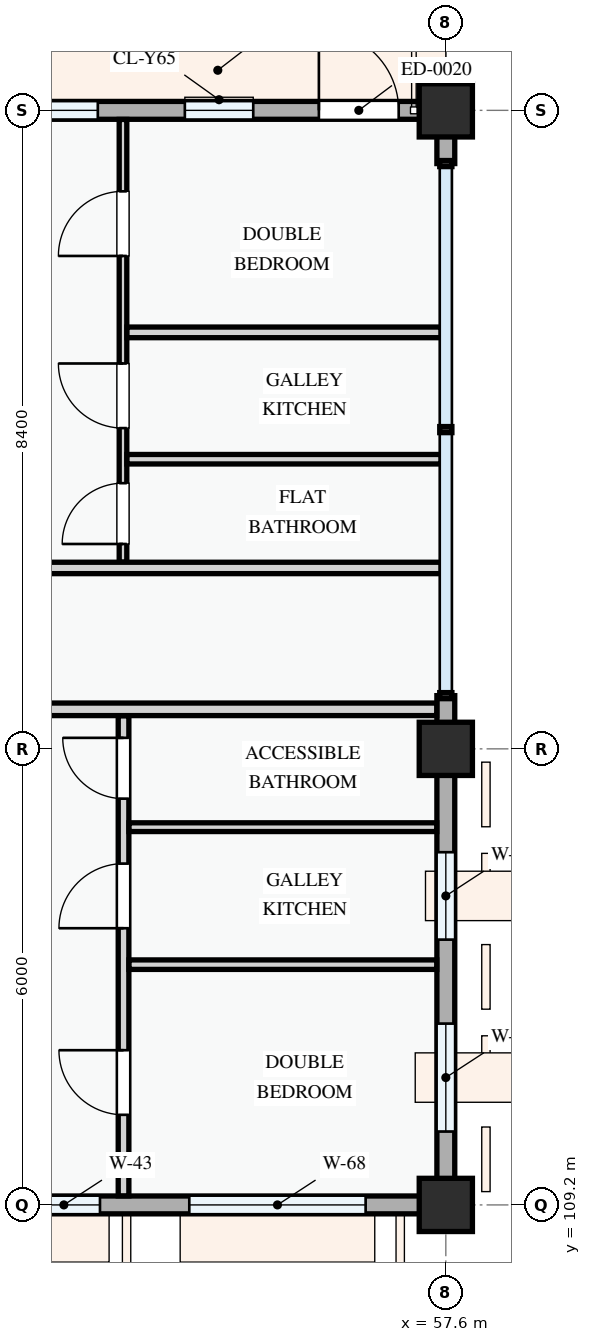
"""IFC4 building model, lengths in metres.
Left out: names, types, materials, properties, quantities, classifications, styles, units other than length and angle.
Written with IfcOpenShell. Run it as: python <this file> out.ifc"""

import sys

from ifc_helpers import new_model, si_unit, direction, frame, frame_2d, origin, origin_2d, place, context, subcontext, project, spatial, rectangle, extrude, element, fill, save


model = new_model("IFC4")
c1 = context("Model", 3, precision=1e-05, world=origin(), true_north=direction((0.0, 1.0)))
c2 = subcontext(c1, "Body", "Model", "MODEL_VIEW")
j1 = project(units=[si_unit("LENGTHUNIT", "METRE"), si_unit("PLANEANGLEUNIT", "RADIAN")], contexts=[c1])
p1 = place(None, origin())
s1 = spatial("IfcSite", under=j1, at=p1, CompositionType="ELEMENT")
p2 = place(p1, origin())
s2 = spatial("IfcBuilding", under=s1, at=p2, CompositionType="ELEMENT")
p3 = place(p2, frame((0.0, 0.0, 11.4)))
s3 = spatial("IfcBuildingStorey", under=s2, at=p3, CompositionType="ELEMENT", Elevation=11.4)
for number, where, z_axis, x_axis in (
    (1, (57.6, 109.2, 0.0), (0.0, 0.0, 1.0), (1.0, 0.0, 0.0)),
    (2, (57.6, 115.2, 0.0), (0.0, 0.0, 1.0), (1.0, 0.0, 0.0)),
    (3, (57.6, 123.6, 0.0), (0.0, 0.0, 1.0), (1.0, 0.0, 0.0)),
):
    element("IfcColumn", number, at=place(p3, frame(where, z_axis=z_axis, x_axis=x_axis)), inside=s3, PredefinedType="COLUMN", context=c2, shape_type="SweptSolid", body=[
        extrude(rectangle(XDim=0.7, YDim=0.7, at=origin_2d()), origin(), (0.0, 0.0, 1.0), 3.3),
    ])
p4 = place(p3, frame((51.6, 109.2, 0.0), z_axis=(0.0, 0.0, 1.0), x_axis=(1.0, 0.0, 0.0)))
e4 = element("IfcWall", 4, at=p4, inside=s3, PredefinedType="STANDARD", context=c2, shape_type="SweptSolid", body=[
    extrude(rectangle(XDim=6.0, YDim=0.235, at=frame_2d((3.0, 0.0))), origin(), (0.0, 0.0, 1.0), 2.475),
])
p5 = place(p4, frame((0.5, 0.0, 0.78)))
e5 = element("IfcOpeningElement", 5, at=p5, cuts=e4, PredefinedType="OPENING", context=c2, shape_type="SweptSolid", body=[
    extrude(rectangle(XDim=0.95, YDim=1.15, at=frame_2d((0.475, 0.575))), frame((0.0, 0.127, 0.0), z_axis=(0.0, -1.0, 0.0), x_axis=(1.0, 0.0, 0.0)), (0.0, 0.0, 1.0), 0.255),
])
p6 = place(p4, frame((2.625, 0.0, 0.78)))
e6 = element("IfcOpeningElement", 6, at=p6, cuts=e4, PredefinedType="OPENING", context=c2, shape_type="SweptSolid", body=[
    extrude(rectangle(XDim=2.32, YDim=1.5, at=frame_2d((1.16, 0.75))), frame((0.0, 0.127, 0.0), z_axis=(0.0, -1.0, 0.0), x_axis=(1.0, 0.0, 0.0)), (0.0, 0.0, 1.0), 0.255),
])
p7 = place(p3, frame((57.6, 109.2, 0.0), z_axis=(0.0, 0.0, 1.0), x_axis=(0.0, 1.0, 0.0)))
e7 = element("IfcWall", 7, at=p7, inside=s3, PredefinedType="STANDARD", context=c2, shape_type="SweptSolid", body=[
    extrude(rectangle(XDim=6.0, YDim=0.235, at=frame_2d((3.0, 0.0))), origin(), (0.0, 0.0, 1.0), 2.575),
])
p8 = place(p7, frame((0.965, 0.0, 0.78)))
e8 = element("IfcOpeningElement", 8, at=p8, cuts=e7, PredefinedType="OPENING", context=c2, shape_type="SweptSolid", body=[
    extrude(rectangle(XDim=1.42, YDim=1.38, at=frame_2d((0.71, 0.69))), frame((0.0, 0.127, 0.0), z_axis=(0.0, -1.0, 0.0), x_axis=(1.0, 0.0, 0.0)), (0.0, 0.0, 1.0), 0.255),
])
p9 = place(p7, frame((3.49, 0.0, 0.78)))
e9 = element("IfcOpeningElement", 9, at=p9, cuts=e7, PredefinedType="OPENING", context=c2, shape_type="SweptSolid", body=[
    extrude(rectangle(XDim=1.15, YDim=1.25, at=frame_2d((0.575, 0.625))), frame((0.0, 0.127, 0.0), z_axis=(0.0, -1.0, 0.0), x_axis=(1.0, 0.0, 0.0)), (0.0, 0.0, 1.0), 0.255),
])
p10 = place(p3, frame((57.6, 115.2, 0.0), z_axis=(0.0, 0.0, 1.0), x_axis=(0.0, 1.0, 0.0)))
e10 = element("IfcWall", 10, at=p10, inside=s3, PredefinedType="STANDARD", context=c2, shape_type="SweptSolid", body=[
    extrude(rectangle(XDim=0.7, YDim=0.235, at=frame_2d((0.35, 0.0))), origin(), (0.0, 0.0, 1.0), 2.425),
])
p11 = place(p3, frame((57.6, 122.9, 0.0), z_axis=(0.0, 0.0, 1.0), x_axis=(0.0, 1.0, 0.0)))
e11 = element("IfcWall", 11, at=p11, inside=s3, PredefinedType="STANDARD", context=c2, shape_type="SweptSolid", body=[
    extrude(rectangle(XDim=0.581, YDim=0.235, at=frame_2d((0.29, 0.0))), origin(), (0.0, 0.0, 1.0), 2.425),
])
p12 = place(p3, frame((57.6, 123.6, 0.0), z_axis=(0.0, 0.0, 1.0), x_axis=(-1.0, 0.0, 0.0)))
e12 = element("IfcWall", 12, at=p12, inside=s3, PredefinedType="STANDARD", context=c2, shape_type="SweptSolid", body=[
    extrude(rectangle(XDim=6.0, YDim=0.235, at=frame_2d((3.0, 0.0))), origin(), (0.0, 0.0, 1.0), 2.475),
])
p13 = place(p12, frame((0.62, 0.0, 0.0)))
e13 = element("IfcOpeningElement", 13, at=p13, cuts=e12, PredefinedType="OPENING", context=c2, shape_type="SweptSolid", body=[
    extrude(rectangle(XDim=1.05, YDim=2.15, at=frame_2d((0.525, 1.075))), frame((0.0, 0.127, 0.0), z_axis=(0.0, -1.0, 0.0), x_axis=(1.0, 0.0, 0.0)), (0.0, 0.0, 1.0), 0.255),
])
p14 = place(p12, frame((2.534, 0.0, 0.78)))
e14 = element("IfcOpeningElement", 14, at=p14, cuts=e12, PredefinedType="OPENING", context=c2, shape_type="SweptSolid", body=[
    extrude(rectangle(XDim=0.9, YDim=1.2, at=frame_2d((0.45, 0.6))), frame((0.0, 0.127, 0.0), z_axis=(0.0, -1.0, 0.0), x_axis=(1.0, 0.0, 0.0)), (0.0, 0.0, 1.0), 0.255),
])
p15 = place(p12, frame((4.579, 0.0, 0.78)))
e15 = element("IfcOpeningElement", 15, at=p15, cuts=e12, PredefinedType="OPENING", context=c2, shape_type="SweptSolid", body=[
    extrude(rectangle(XDim=0.9, YDim=1.2, at=frame_2d((0.45, 0.6))), frame((0.0, 0.127, 0.0), z_axis=(0.0, -1.0, 0.0), x_axis=(1.0, 0.0, 0.0)), (0.0, 0.0, 1.0), 0.255),
])
p16 = place(p3, frame((53.36, 109.32, 0.0), z_axis=(0.0, 0.0, 1.0), x_axis=(0.0, 1.0, 0.0)))
e16 = element("IfcWall", 16, at=p16, inside=s3, PredefinedType="PARTITIONING", context=c2, shape_type="SweptSolid", body=[
    extrude(rectangle(XDim=6.316, YDim=0.14, at=frame_2d((3.158, 0.0))), origin(), (0.0, 0.0, 1.0), 3.0),
])
p17 = place(p16, frame((1.066, 0.0, 0.0)))
e17 = element("IfcOpeningElement", 17, at=p17, cuts=e16, PredefinedType="OPENING", context=c2, shape_type="SweptSolid", body=[
    extrude(rectangle(XDim=0.85, YDim=2.1, at=frame_2d((0.425, 1.05))), frame((0.0, 0.08, 0.0), z_axis=(0.0, -1.0, 0.0), x_axis=(1.0, 0.0, 0.0)), (0.0, 0.0, 1.0), 0.16),
])
p18 = place(p16, frame((3.521, 0.0, 0.0)))
e18 = element("IfcOpeningElement", 18, at=p18, cuts=e16, PredefinedType="OPENING", context=c2, shape_type="SweptSolid", body=[
    extrude(rectangle(XDim=0.85, YDim=2.1, at=frame_2d((0.425, 1.05))), frame((0.0, 0.08, 0.0), z_axis=(0.0, -1.0, 0.0), x_axis=(1.0, 0.0, 0.0)), (0.0, 0.0, 1.0), 0.16),
])
p19 = place(p16, frame((5.225, 0.0, 0.0)))
e19 = element("IfcOpeningElement", 19, at=p19, cuts=e16, PredefinedType="OPENING", context=c2, shape_type="SweptSolid", body=[
    extrude(rectangle(XDim=0.8, YDim=2.1, at=frame_2d((0.4, 1.05))), frame((0.0, 0.08, 0.0), z_axis=(0.0, -1.0, 0.0), x_axis=(1.0, 0.0, 0.0)), (0.0, 0.0, 1.0), 0.16),
])
p20 = place(p3, frame((53.432, 112.361, 0.0), z_axis=(0.0, 0.0, 1.0), x_axis=(1.0, 0.0, 0.0)))
e20 = element("IfcWall", 20, at=p20, inside=s3, PredefinedType="PARTITIONING", context=c2, shape_type="SweptSolid", body=[
    extrude(rectangle(XDim=4.049, YDim=0.125, at=frame_2d((2.024, 0.0))), origin(), (0.0, 0.0, 1.0), 3.0),
])
p21 = place(p3, frame((53.432, 114.17, 0.0), z_axis=(0.0, 0.0, 1.0), x_axis=(1.0, 0.0, 0.0)))
e21 = element("IfcWall", 21, at=p21, inside=s3, PredefinedType="PARTITIONING", context=c2, shape_type="SweptSolid", body=[
    extrude(rectangle(XDim=4.049, YDim=0.115, at=frame_2d((2.024, 0.0))), origin(), (0.0, 0.0, 1.0), 3.0),
])
p22 = place(p3, frame((53.353, 117.657, 0.0), z_axis=(0.0, 0.0, 1.0), x_axis=(0.0, 1.0, 0.0)))
e22 = element("IfcWall", 22, at=p22, inside=s3, PredefinedType="PARTITIONING", context=c2, shape_type="SweptSolid", body=[
    extrude(rectangle(XDim=5.823, YDim=0.1, at=frame_2d((2.912, 0.0))), origin(), (0.0, 0.0, 1.0), 3.0),
])
p23 = place(p22, frame((0.238, 0.0, 0.0)))
e23 = element("IfcOpeningElement", 23, at=p23, cuts=e22, PredefinedType="OPENING", context=c2, shape_type="SweptSolid", body=[
    extrude(rectangle(XDim=0.8, YDim=2.1, at=frame_2d((0.4, 1.05))), frame((0.0, 0.06, 0.0), z_axis=(0.0, -1.0, 0.0), x_axis=(1.0, 0.0, 0.0)), (0.0, 0.0, 1.0), 0.12),
])
p24 = place(p22, frame((1.763, 0.0, 0.0)))
e24 = element("IfcOpeningElement", 24, at=p24, cuts=e22, PredefinedType="OPENING", context=c2, shape_type="SweptSolid", body=[
    extrude(rectangle(XDim=0.85, YDim=2.1, at=frame_2d((0.425, 1.05))), frame((0.0, 0.06, 0.0), z_axis=(0.0, -1.0, 0.0), x_axis=(1.0, 0.0, 0.0)), (0.0, 0.0, 1.0), 0.12),
])
p25 = place(p22, frame((4.028, 0.0, 0.0)))
e25 = element("IfcOpeningElement", 25, at=p25, cuts=e22, PredefinedType="OPENING", context=c2, shape_type="SweptSolid", body=[
    extrude(rectangle(XDim=0.85, YDim=2.1, at=frame_2d((0.425, 1.05))), frame((0.0, 0.06, 0.0), z_axis=(0.0, -1.0, 0.0), x_axis=(1.0, 0.0, 0.0)), (0.0, 0.0, 1.0), 0.12),
])
p26 = place(p3, frame((53.405, 120.679, 0.0), z_axis=(0.0, 0.0, 1.0), x_axis=(1.0, 0.0, 0.0)))
e26 = element("IfcWall", 26, at=p26, inside=s3, PredefinedType="PARTITIONING", context=c2, shape_type="SweptSolid", body=[
    extrude(rectangle(XDim=4.135, YDim=0.14, at=frame_2d((2.068, 0.0))), origin(), (0.0, 0.0, 1.0), 3.0),
])
p27 = place(p3, frame((53.405, 119.01, 0.0), z_axis=(0.0, 0.0, 1.0), x_axis=(1.0, 0.0, 0.0)))
e27 = element("IfcWall", 27, at=p27, inside=s3, PredefinedType="PARTITIONING", context=c2, shape_type="SweptSolid", body=[
    extrude(rectangle(XDim=4.135, YDim=0.125, at=frame_2d((2.068, 0.0))), origin(), (0.0, 0.0, 1.0), 3.0),
])
p28 = place(p3, frame((25.15, 115.72, 0.0), z_axis=(0.0, 0.0, 1.0), x_axis=(1.0, 0.0, 0.0)))
e28 = element("IfcWall", 28, at=p28, inside=s3, PredefinedType="PARTITIONING", context=c2, shape_type="SweptSolid", body=[
    extrude(rectangle(XDim=32.331, YDim=0.165, at=frame_2d((16.165, 0.0))), origin(), (0.0, 0.0, 1.0), 3.0),
])
p29 = place(p28, frame((0.25, 0.0, 0.0)))
e29 = element("IfcOpeningElement", 29, at=p29, cuts=e28, PredefinedType="OPENING", context=c2, shape_type="SweptSolid", body=[
    extrude(rectangle(XDim=0.92, YDim=2.1, at=frame_2d((0.46, 1.05))), frame((0.0, 0.093, 0.0), z_axis=(0.0, -1.0, 0.0), x_axis=(1.0, 0.0, 0.0)), (0.0, 0.0, 1.0), 0.185),
])
p30 = place(p28, frame((14.548, 0.0, 0.0)))
e30 = element("IfcOpeningElement", 30, at=p30, cuts=e28, PredefinedType="OPENING", context=c2, shape_type="SweptSolid", body=[
    extrude(rectangle(XDim=0.96, YDim=2.12, at=frame_2d((0.48, 1.06))), frame((0.0, 0.093, 0.0), z_axis=(0.0, -1.0, 0.0), x_axis=(1.0, 0.0, 0.0)), (0.0, 0.0, 1.0), 0.185),
])
p31 = place(p28, frame((22.28, 0.0, 0.0)))
e31 = element("IfcOpeningElement", 31, at=p31, cuts=e28, PredefinedType="OPENING", context=c2, shape_type="SweptSolid", body=[
    extrude(rectangle(XDim=0.92, YDim=2.1, at=frame_2d((0.46, 1.05))), frame((0.0, 0.093, 0.0), z_axis=(0.0, -1.0, 0.0), x_axis=(1.0, 0.0, 0.0)), (0.0, 0.0, 1.0), 0.185),
])
p32 = place(p3, frame((22.66, 117.58, 0.0), z_axis=(0.0, 0.0, 1.0), x_axis=(1.0, 0.0, 0.0)))
e32 = element("IfcWall", 32, at=p32, inside=s3, PredefinedType="PARTITIONING", context=c2, shape_type="SweptSolid", body=[
    extrude(rectangle(XDim=34.88, YDim=0.15, at=frame_2d((17.44, 0.0))), origin(), (0.0, 0.0, 1.0), 3.0),
])
p33 = place(p32, frame((2.74, 0.0, 0.0)))
e33 = element("IfcOpeningElement", 33, at=p33, cuts=e32, PredefinedType="OPENING", context=c2, shape_type="SweptSolid", body=[
    extrude(rectangle(XDim=0.92, YDim=2.1, at=frame_2d((0.46, 1.05))), frame((0.0, 0.085, 0.0), z_axis=(0.0, -1.0, 0.0), x_axis=(1.0, 0.0, 0.0)), (0.0, 0.0, 1.0), 0.17),
])
p34 = place(p32, frame((17.085, 0.0, 0.0)))
e34 = element("IfcOpeningElement", 34, at=p34, cuts=e32, PredefinedType="OPENING", context=c2, shape_type="SweptSolid", body=[
    extrude(rectangle(XDim=0.92, YDim=2.1, at=frame_2d((0.46, 1.05))), frame((0.0, 0.085, 0.0), z_axis=(0.0, -1.0, 0.0), x_axis=(1.0, 0.0, 0.0)), (0.0, 0.0, 1.0), 0.17),
])
p35 = place(p32, frame((24.77, 0.0, 0.0)))
e35 = element("IfcOpeningElement", 35, at=p35, cuts=e32, PredefinedType="OPENING", context=c2, shape_type="SweptSolid", body=[
    extrude(rectangle(XDim=0.92, YDim=2.1, at=frame_2d((0.46, 1.05))), frame((0.0, 0.085, 0.0), z_axis=(0.0, -1.0, 0.0), x_axis=(1.0, 0.0, 0.0)), (0.0, 0.0, 1.0), 0.17),
])
p36 = place(p5, origin())
e36 = element("IfcWindow", 36, at=p36, inside=s3, PartitioningType="SINGLE_PANEL", PredefinedType="WINDOW", context=c2, shape_type="SweptSolid", body=[
    extrude(rectangle(XDim=0.95, YDim=1.15, at=frame_2d((0.475, 0.575))), frame((0.0, 0.03, 0.0), z_axis=(0.0, -1.0, 0.0), x_axis=(1.0, 0.0, 0.0)), (0.0, 0.0, 1.0), 0.06),
])
fill(e5, e36)
p37 = place(p6, origin())
e37 = element("IfcWindow", 37, at=p37, inside=s3, PartitioningType="DOUBLE_PANEL_VERTICAL", PredefinedType="WINDOW", context=c2, shape_type="SweptSolid", body=[
    extrude(rectangle(XDim=2.32, YDim=1.5, at=frame_2d((1.16, 0.75))), frame((0.0, 0.03, 0.0), z_axis=(0.0, -1.0, 0.0), x_axis=(1.0, 0.0, 0.0)), (0.0, 0.0, 1.0), 0.06),
])
fill(e6, e37)
p38 = place(p8, origin())
e38 = element("IfcWindow", 38, at=p38, inside=s3, PartitioningType="SINGLE_PANEL", PredefinedType="WINDOW", context=c2, shape_type="SweptSolid", body=[
    extrude(rectangle(XDim=1.42, YDim=1.38, at=frame_2d((0.71, 0.69))), frame((0.0, 0.03, 0.0), z_axis=(0.0, -1.0, 0.0), x_axis=(1.0, 0.0, 0.0)), (0.0, 0.0, 1.0), 0.06),
])
fill(e8, e38)
p39 = place(p9, origin())
e39 = element("IfcWindow", 39, at=p39, inside=s3, PartitioningType="SINGLE_PANEL", PredefinedType="WINDOW", context=c2, shape_type="SweptSolid", body=[
    extrude(rectangle(XDim=1.15, YDim=1.25, at=frame_2d((0.575, 0.625))), frame((0.0, 0.03, 0.0), z_axis=(0.0, -1.0, 0.0), x_axis=(1.0, 0.0, 0.0)), (0.0, 0.0, 1.0), 0.06),
])
fill(e9, e39)
p40 = place(p13, frame((1.05, 0.0, 0.0), z_axis=(0.0, 0.0, 1.0), x_axis=(-1.0, 0.0, 0.0)))
e40 = element("IfcDoor", 40, at=p40, inside=s3, OperationType="SINGLE_SWING_LEFT", PredefinedType="DOOR", context=c2, shape_type="SweptSolid", body=[
    extrude(rectangle(XDim=1.05, YDim=2.15, at=frame_2d((0.525, 1.075))), frame((0.0, 0.025, 0.0), z_axis=(0.0, -1.0, 0.0), x_axis=(1.0, 0.0, 0.0)), (0.0, 0.0, 1.0), 0.05),
])
fill(e13, e40)
p41 = place(p14, origin())
e41 = element("IfcWindow", 41, at=p41, inside=s3, PartitioningType="SINGLE_PANEL", PredefinedType="WINDOW", context=c2, shape_type="SweptSolid", body=[
    extrude(rectangle(XDim=0.9, YDim=1.2, at=frame_2d((0.45, 0.6))), frame((0.0, 0.03, 0.0), z_axis=(0.0, -1.0, 0.0), x_axis=(1.0, 0.0, 0.0)), (0.0, 0.0, 1.0), 0.06),
])
fill(e14, e41)
p42 = place(p15, origin())
e42 = element("IfcWindow", 42, at=p42, inside=s3, PartitioningType="SINGLE_PANEL", PredefinedType="WINDOW", context=c2, shape_type="SweptSolid", body=[
    extrude(rectangle(XDim=0.9, YDim=1.2, at=frame_2d((0.45, 0.6))), frame((0.0, 0.03, 0.0), z_axis=(0.0, -1.0, 0.0), x_axis=(1.0, 0.0, 0.0)), (0.0, 0.0, 1.0), 0.06),
])
fill(e15, e42)
p43 = place(p17, origin())
e43 = element("IfcDoor", 43, at=p43, inside=s3, OperationType="SINGLE_SWING_RIGHT", PredefinedType="DOOR", context=c2, shape_type="SweptSolid", body=[
    extrude(rectangle(XDim=0.85, YDim=2.1, at=frame_2d((0.425, 1.05))), frame((0.0, 0.025, 0.0), z_axis=(0.0, -1.0, 0.0), x_axis=(1.0, 0.0, 0.0)), (0.0, 0.0, 1.0), 0.05),
])
fill(e17, e43)
p44 = place(p18, origin())
e44 = element("IfcDoor", 44, at=p44, inside=s3, OperationType="SINGLE_SWING_LEFT", PredefinedType="DOOR", context=c2, shape_type="SweptSolid", body=[
    extrude(rectangle(XDim=0.85, YDim=2.1, at=frame_2d((0.425, 1.05))), frame((0.0, 0.025, 0.0), z_axis=(0.0, -1.0, 0.0), x_axis=(1.0, 0.0, 0.0)), (0.0, 0.0, 1.0), 0.05),
])
fill(e18, e44)
p45 = place(p19, origin())
e45 = element("IfcDoor", 45, at=p45, inside=s3, OperationType="SINGLE_SWING_RIGHT", PredefinedType="DOOR", context=c2, shape_type="SweptSolid", body=[
    extrude(rectangle(XDim=0.8, YDim=2.1, at=frame_2d((0.4, 1.05))), frame((0.0, 0.025, 0.0), z_axis=(0.0, -1.0, 0.0), x_axis=(1.0, 0.0, 0.0)), (0.0, 0.0, 1.0), 0.05),
])
fill(e19, e45)
p46 = place(p23, origin())
e46 = element("IfcDoor", 46, at=p46, inside=s3, OperationType="SINGLE_SWING_LEFT", PredefinedType="DOOR", context=c2, shape_type="SweptSolid", body=[
    extrude(rectangle(XDim=0.8, YDim=2.1, at=frame_2d((0.4, 1.05))), frame((0.0, 0.025, 0.0), z_axis=(0.0, -1.0, 0.0), x_axis=(1.0, 0.0, 0.0)), (0.0, 0.0, 1.0), 0.05),
])
fill(e23, e46)
p47 = place(p24, origin())
e47 = element("IfcDoor", 47, at=p47, inside=s3, OperationType="SINGLE_SWING_RIGHT", PredefinedType="DOOR", context=c2, shape_type="SweptSolid", body=[
    extrude(rectangle(XDim=0.85, YDim=2.1, at=frame_2d((0.425, 1.05))), frame((0.0, 0.025, 0.0), z_axis=(0.0, -1.0, 0.0), x_axis=(1.0, 0.0, 0.0)), (0.0, 0.0, 1.0), 0.05),
])
fill(e24, e47)
p48 = place(p25, origin())
e48 = element("IfcDoor", 48, at=p48, inside=s3, OperationType="SINGLE_SWING_LEFT", PredefinedType="DOOR", context=c2, shape_type="SweptSolid", body=[
    extrude(rectangle(XDim=0.85, YDim=2.1, at=frame_2d((0.425, 1.05))), frame((0.0, 0.025, 0.0), z_axis=(0.0, -1.0, 0.0), x_axis=(1.0, 0.0, 0.0)), (0.0, 0.0, 1.0), 0.05),
])
fill(e25, e48)
save(model, sys.argv[1])
